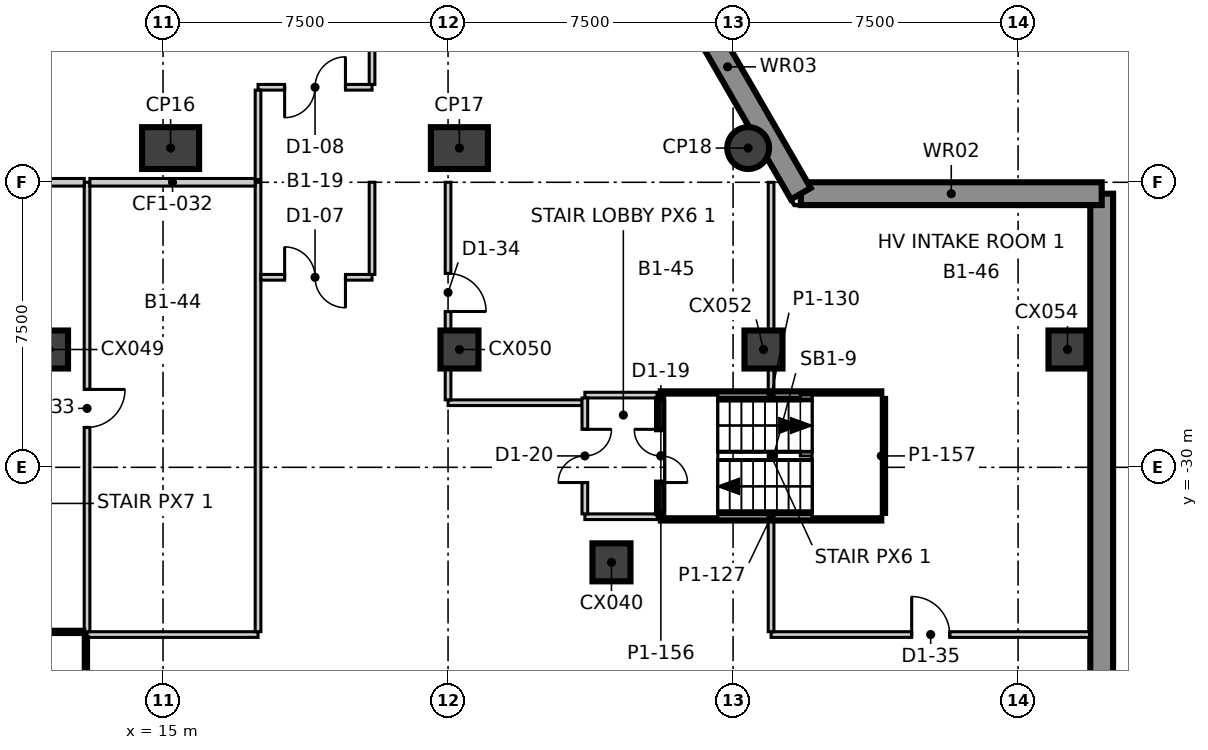
"""IFC4 building model, lengths in metres.
Left out: names, types, materials, properties, quantities, classifications, styles, units other than length and angle.
Written with IfcOpenShell. Run it as: python <this file> out.ifc"""

import sys

from ifc_helpers import new_model, si_unit, direction, frame, frame_2d, origin, origin_2d, place, context, subcontext, project, spatial, rectangle, circle, extrude, element, fill, save


model = new_model("IFC4")
c1 = context("Model", 3, precision=1e-05, world=origin(), true_north=direction((0.0, 1.0)))
c2 = subcontext(c1, "Body", "Model", "MODEL_VIEW")
j1 = project(units=[si_unit("LENGTHUNIT", "METRE"), si_unit("PLANEANGLEUNIT", "RADIAN")], contexts=[c1])
p1 = place(None, origin())
s1 = spatial("IfcSite", under=j1, at=p1, CompositionType="ELEMENT")
p2 = place(p1, origin())
s2 = spatial("IfcBuilding", under=s1, at=p2, CompositionType="ELEMENT")
p3 = place(p2, frame((0.0, 0.0, -5.5)))
s3 = spatial("IfcBuildingStorey", under=s2, at=p3, CompositionType="ELEMENT", Elevation=-5.5)
p4 = place(p3, frame((39.7, -50.2, -0.4), z_axis=(0.0, 0.0, 1.0), x_axis=(0.0, 1.0, 0.0)))
e1 = element("IfcWall", 1, at=p4, inside=s3, PredefinedType="SOLIDWALL", context=c2, shape_type="SweptSolid", body=[
    extrude(rectangle(XDim=27.4, YDim=0.6, at=frame_2d((13.7, 0.0))), origin(), (0.0, 0.0, 1.0), 5.5),
])
p5 = place(p3, frame((39.7, -22.8, -0.4), z_axis=(0.0, 0.0, 1.0), x_axis=(-1.0, 0.0, 0.0)))
e2 = element("IfcWall", 2, at=p5, inside=s3, PredefinedType="SOLIDWALL", context=c2, shape_type="SweptSolid", body=[
    extrude(rectangle(XDim=7.917, YDim=0.6, at=frame_2d((3.958, 0.0))), origin(), (0.0, 0.0, 1.0), 5.5),
])
p6 = place(p3, frame((31.783, -22.8, -0.4), z_axis=(0.0, 0.0, 1.0), x_axis=(-0.500015828289, 0.866016265125, 0.0)))
e3 = element("IfcWall", 3, at=p6, inside=s3, PredefinedType="SOLIDWALL", context=c2, shape_type="SweptSolid", body=[
    extrude(rectangle(XDim=7.708, YDim=0.6, at=frame_2d((3.854, 0.0))), origin(), (0.0, 0.0, 1.0), 5.5),
])
for number, where, z_axis, x_axis in (
    (4, (15.199, -21.6, -0.4), (0.0, 0.0, 1.0), (1.0, 0.0, 0.0)),
    (5, (22.798, -21.6, -0.4), (0.0, 0.0, 1.0), (1.0, 0.0, 0.0)),
):
    element("IfcColumn", number, at=place(p3, frame(where, z_axis=z_axis, x_axis=x_axis)), inside=s3, PredefinedType="COLUMN", context=c2, shape_type="SweptSolid", body=[
        extrude(rectangle(XDim=1.5, YDim=1.1, at=origin_2d()), origin(), (0.0, 0.0, 1.0), 5.5),
    ])
p7 = place(p3, frame((30.397, -21.6, -0.4), z_axis=(0.0, 0.0, 1.0), x_axis=(1.0, 0.0, 0.0)))
e6 = element("IfcColumn", 6, at=p7, inside=s3, PredefinedType="COLUMN", context=c2, shape_type="SweptSolid", body=[
    extrude(circle(Radius=0.55, at=origin_2d()), origin(), (0.0, 0.0, 1.0), 5.5),
])
for number, where, z_axis, x_axis in (
    (7, (26.8, -32.5, -0.4), (0.0, 0.0, 1.0), (1.0, 0.0, 0.0)),
    (8, (12.0, -26.9, -0.4), (0.0, 0.0, 1.0), (1.0, 0.0, 0.0)),
    (9, (22.8, -26.9, -0.4), (0.0, 0.0, 1.0), (1.0, 0.0, 0.0)),
    (10, (30.8, -26.9, -0.4), (0.0, 0.0, 1.0), (1.0, 0.0, 0.0)),
    (11, (38.8, -26.9, -0.4), (0.0, 0.0, 1.0), (1.0, 0.0, 0.0)),
):
    element("IfcColumn", number, at=place(p3, frame(where, z_axis=z_axis, x_axis=x_axis)), inside=s3, PredefinedType="COLUMN", context=c2, shape_type="SweptSolid", body=[
        extrude(rectangle(XDim=1.0, YDim=1.0, at=origin_2d()), origin(), (0.0, 0.0, 1.0), 5.5),
    ])
for number, where, z_axis, x_axis in (
    (12, (26.1, -28.1, 0.0), (0.0, 0.0, 1.0), (1.0, 0.0, 0.0)),
    (13, (26.1, -31.3, 0.0), (0.0, 0.0, 1.0), (1.0, 0.0, 0.0)),
):
    element("IfcWall", number, at=place(p3, frame(where, z_axis=z_axis, x_axis=x_axis)), inside=s3, PredefinedType="PARTITIONING", context=c2, shape_type="SweptSolid", body=[
        extrude(rectangle(XDim=1.9, YDim=0.15, at=frame_2d((0.95, 0.0))), origin(), (0.0, 0.0, 1.0), 5.1),
    ])
p8 = place(p3, frame((13.0, -34.4, 0.0), z_axis=(0.0, 0.0, 1.0), x_axis=(1.0, 0.0, 0.0)))
e14 = element("IfcWall", 14, at=p8, inside=s3, PredefinedType="PARTITIONING", context=c2, shape_type="SweptSolid", body=[
    extrude(rectangle(XDim=4.5, YDim=0.15, at=frame_2d((2.25, 0.0))), origin(), (0.0, 0.0, 1.0), 5.1),
])
p9 = place(p3, frame((31.0, -34.4, 0.0), z_axis=(0.0, 0.0, 1.0), x_axis=(1.0, 0.0, 0.0)))
e15 = element("IfcWall", 15, at=p9, inside=s3, PredefinedType="PARTITIONING", context=c2, shape_type="SweptSolid", body=[
    extrude(rectangle(XDim=8.4, YDim=0.15, at=frame_2d((4.2, 0.0))), origin(), (0.0, 0.0, 1.0), 5.1),
])
p10 = place(p9, frame((3.7, 0.0, 0.0)))
e16 = element("IfcOpeningElement", 16, at=p10, cuts=e15, PredefinedType="OPENING", context=c2, shape_type="SweptSolid", body=[
    extrude(rectangle(XDim=1.0, YDim=2.1, at=frame_2d((0.5, 1.05))), frame((0.0, 0.085, 0.0), z_axis=(0.0, -1.0, 0.0), x_axis=(1.0, 0.0, 0.0)), (0.0, 0.0, 1.0), 0.17),
])
p11 = place(p3, frame((17.5, -34.325, 0.0), z_axis=(0.0, 0.0, 1.0), x_axis=(0.0, 1.0, 0.0)))
e17 = element("IfcWall", 17, at=p11, inside=s3, PredefinedType="PARTITIONING", context=c2, shape_type="SweptSolid", body=[
    extrude(rectangle(XDim=11.825, YDim=0.15, at=frame_2d((5.913, 0.0))), origin(), (0.0, 0.0, 1.0), 5.1),
])
p12 = place(p3, frame((13.0, -34.325, 0.0), z_axis=(0.0, 0.0, 1.0), x_axis=(0.0, 1.0, 0.0)))
e18 = element("IfcWall", 18, at=p12, inside=s3, PredefinedType="PARTITIONING", context=c2, shape_type="SweptSolid", body=[
    extrude(rectangle(XDim=11.825, YDim=0.15, at=frame_2d((5.913, 0.0))), origin(), (0.0, 0.0, 1.0), 5.1),
])
p13 = place(p12, frame((5.375, 0.0, 0.0)))
e19 = element("IfcOpeningElement", 19, at=p13, cuts=e18, PredefinedType="OPENING", context=c2, shape_type="SweptSolid", body=[
    extrude(rectangle(XDim=1.0, YDim=2.1, at=frame_2d((0.5, 1.05))), frame((0.0, 0.085, 0.0), z_axis=(0.0, -1.0, 0.0), x_axis=(1.0, 0.0, 0.0)), (0.0, 0.0, 1.0), 0.17),
])
p14 = place(p3, frame((13.075, -22.5, 0.0), z_axis=(0.0, 0.0, 1.0), x_axis=(1.0, 0.0, 0.0)))
e20 = element("IfcWall", 20, at=p14, inside=s3, PredefinedType="SOLIDWALL", context=c2, shape_type="SweptSolid", body=[
    extrude(rectangle(XDim=4.35, YDim=0.2, at=frame_2d((2.175, 0.0))), origin(), (0.0, 0.0, 1.0), 5.1),
])
p15 = place(p3, frame((22.5, -28.3, 0.0), z_axis=(0.0, 0.0, 1.0), x_axis=(1.0, 0.0, 0.0)))
e21 = element("IfcWall", 21, at=p15, inside=s3, PredefinedType="PARTITIONING", context=c2, shape_type="SweptSolid", body=[
    extrude(rectangle(XDim=3.525, YDim=0.15, at=frame_2d((1.762, 0.0))), origin(), (0.0, 0.0, 1.0), 5.1),
])
p16 = place(p3, frame((22.5, -28.225, 0.0), z_axis=(0.0, 0.0, 1.0), x_axis=(0.0, 1.0, 0.0)))
e22 = element("IfcWall", 22, at=p16, inside=s3, PredefinedType="PARTITIONING", context=c2, shape_type="SweptSolid", body=[
    extrude(rectangle(XDim=5.725, YDim=0.15, at=frame_2d((2.863, 0.0))), origin(), (0.0, 0.0, 1.0), 5.1),
])
p17 = place(p16, frame((2.325, 0.0, 0.0)))
e23 = element("IfcOpeningElement", 23, at=p17, cuts=e22, PredefinedType="OPENING", context=c2, shape_type="SweptSolid", body=[
    extrude(rectangle(XDim=1.0, YDim=2.1, at=frame_2d((0.5, 1.05))), frame((0.0, 0.085, 0.0), z_axis=(0.0, -1.0, 0.0), x_axis=(1.0, 0.0, 0.0)), (0.0, 0.0, 1.0), 0.17),
])
p18 = place(p3, frame((26.1, -31.225, 0.0), z_axis=(0.0, 0.0, 1.0), x_axis=(0.0, 1.0, 0.0)))
e24 = element("IfcWall", 24, at=p18, inside=s3, PredefinedType="PARTITIONING", context=c2, shape_type="SweptSolid", body=[
    extrude(rectangle(XDim=3.05, YDim=0.15, at=frame_2d((1.525, 0.0))), origin(), (0.0, 0.0, 1.0), 5.1),
])
p19 = place(p18, frame((0.825, 0.0, 0.0)))
e25 = element("IfcOpeningElement", 25, at=p19, cuts=e24, PredefinedType="OPENING", context=c2, shape_type="SweptSolid", body=[
    extrude(rectangle(XDim=1.4, YDim=2.1, at=frame_2d((0.7, 1.05))), frame((0.0, 0.085, 0.0), z_axis=(0.0, -1.0, 0.0), x_axis=(1.0, 0.0, 0.0)), (0.0, 0.0, 1.0), 0.17),
])
p20 = place(p3, frame((31.0, -34.325, 0.0), z_axis=(0.0, 0.0, 1.0), x_axis=(0.0, 1.0, 0.0)))
e26 = element("IfcWall", 26, at=p20, inside=s3, PredefinedType="PARTITIONING", context=c2, shape_type="SweptSolid", body=[
    extrude(rectangle(XDim=2.925, YDim=0.15, at=frame_2d((1.462, 0.0))), origin(), (0.0, 0.0, 1.0), 5.1),
])
p21 = place(p3, frame((31.0, -28.0, 0.0), z_axis=(0.0, 0.0, 1.0), x_axis=(0.0, 1.0, 0.0)))
e27 = element("IfcWall", 27, at=p21, inside=s3, PredefinedType="PARTITIONING", context=c2, shape_type="SweptSolid", body=[
    extrude(rectangle(XDim=5.5, YDim=0.15, at=frame_2d((2.75, 0.0))), origin(), (0.0, 0.0, 1.0), 5.1),
])
p22 = place(p3, frame((17.5, -20.0, 0.0), z_axis=(0.0, 0.0, 1.0), x_axis=(1.0, 0.0, 0.0)))
e28 = element("IfcWall", 28, at=p22, inside=s3, PredefinedType="PARTITIONING", context=c2, shape_type="SweptSolid", body=[
    extrude(rectangle(XDim=3.0, YDim=0.15, at=frame_2d((1.5, 0.0))), origin(), (0.0, 0.0, 1.0), 5.1),
])
p23 = place(p22, frame((0.7, 0.0, 0.0)))
e29 = element("IfcOpeningElement", 29, at=p23, cuts=e28, PredefinedType="OPENING", context=c2, shape_type="SweptSolid", body=[
    extrude(rectangle(XDim=1.6, YDim=2.1, at=frame_2d((0.8, 1.05))), frame((0.0, 0.085, 0.0), z_axis=(0.0, -1.0, 0.0), x_axis=(1.0, 0.0, 0.0)), (0.0, 0.0, 1.0), 0.17),
])
p24 = place(p3, frame((17.575, -25.0, 0.0), z_axis=(0.0, 0.0, 1.0), x_axis=(1.0, 0.0, 0.0)))
e30 = element("IfcWall", 30, at=p24, inside=s3, PredefinedType="PARTITIONING", context=c2, shape_type="SweptSolid", body=[
    extrude(rectangle(XDim=2.925, YDim=0.15, at=frame_2d((1.462, 0.0))), origin(), (0.0, 0.0, 1.0), 5.1),
])
p25 = place(p24, frame((0.625, 0.0, 0.0)))
e31 = element("IfcOpeningElement", 31, at=p25, cuts=e30, PredefinedType="OPENING", context=c2, shape_type="SweptSolid", body=[
    extrude(rectangle(XDim=1.6, YDim=2.1, at=frame_2d((0.8, 1.05))), frame((0.0, 0.085, 0.0), z_axis=(0.0, -1.0, 0.0), x_axis=(1.0, 0.0, 0.0)), (0.0, 0.0, 1.0), 0.17),
])
p26 = place(p3, frame((20.5, -24.925, 0.0), z_axis=(0.0, 0.0, 1.0), x_axis=(0.0, 1.0, 0.0)))
e32 = element("IfcWall", 32, at=p26, inside=s3, PredefinedType="PARTITIONING", context=c2, shape_type="SweptSolid", body=[
    extrude(rectangle(XDim=2.427, YDim=0.15, at=frame_2d((1.213, 0.0))), origin(), (0.0, 0.0, 1.0), 5.1),
])
p27 = place(p3, frame((17.5, -22.427, 0.0), z_axis=(0.0, 0.0, 1.0), x_axis=(0.0, 1.0, 0.0)))
e33 = element("IfcWall", 33, at=p27, inside=s3, PredefinedType="PARTITIONING", context=c2, shape_type="SweptSolid", body=[
    extrude(rectangle(XDim=2.352, YDim=0.15, at=frame_2d((1.176, 0.0))), origin(), (0.0, 0.0, 1.0), 5.1),
])
p28 = place(p3, frame((-17.425, -22.5, 0.0), z_axis=(0.0, 0.0, 1.0), x_axis=(1.0, 0.0, 0.0)))
e34 = element("IfcWall", 34, at=p28, inside=s3, PredefinedType="SOLIDWALL", context=c2, shape_type="SweptSolid", body=[
    extrude(rectangle(XDim=30.352, YDim=0.2, at=frame_2d((15.176, 0.0))), origin(), (0.0, 0.0, 1.0), 5.1),
])
p29 = place(p3, frame((20.5, -19.925, 0.0), z_axis=(0.0, 0.0, 1.0), x_axis=(0.0, 1.0, 0.0)))
e35 = element("IfcWall", 35, at=p29, inside=s3, PredefinedType="PARTITIONING", context=c2, shape_type="SweptSolid", body=[
    extrude(rectangle(XDim=1.65, YDim=0.15, at=frame_2d((0.825, 0.0))), origin(), (0.0, 0.0, 1.0), 5.1),
])
for number, where, z_axis, x_axis in (
    (36, (28.1, -31.3, 0.0), (0.0, 0.0, 1.0), (1.0, 0.0, 0.0)),
    (37, (28.1, -28.1, 0.0), (0.0, 0.0, 1.0), (1.0, 0.0, 0.0)),
    (38, (7.1, -34.4, 0.0), (0.0, 0.0, 1.0), (1.0, 0.0, 0.0)),
):
    element("IfcWall", number, at=place(p3, frame(where, z_axis=z_axis, x_axis=x_axis)), inside=s3, PredefinedType="SOLIDWALL", context=c2, shape_type="SweptSolid", body=[
        extrude(rectangle(XDim=5.8, YDim=0.2, at=frame_2d((2.9, 0.0))), origin(), (0.0, 0.0, 1.0), 5.1),
    ])
p30 = place(p3, frame((12.9, -37.5, 0.0), z_axis=(0.0, 0.0, 1.0), x_axis=(0.0, 1.0, 0.0)))
e39 = element("IfcWall", 39, at=p30, inside=s3, PredefinedType="SOLIDWALL", context=c2, shape_type="SweptSolid", body=[
    extrude(rectangle(XDim=3.0, YDim=0.2, at=frame_2d((1.5, 0.0))), origin(), (0.0, 0.0, 1.0), 5.1),
])
p31 = place(p3, frame((28.1, -31.2, 0.0), z_axis=(0.0, 0.0, 1.0), x_axis=(0.0, 1.0, 0.0)))
e40 = element("IfcWall", 40, at=p31, inside=s3, PredefinedType="SOLIDWALL", context=c2, shape_type="SweptSolid", body=[
    extrude(rectangle(XDim=3.0, YDim=0.2, at=frame_2d((1.5, 0.0))), origin(), (0.0, 0.0, 1.0), 5.1),
])
p32 = place(p31, frame((0.8, 0.0, 0.0)))
e41 = element("IfcOpeningElement", 41, at=p32, cuts=e40, PredefinedType="OPENING", context=c2, shape_type="SweptSolid", body=[
    extrude(rectangle(XDim=1.4, YDim=2.1, at=frame_2d((0.7, 1.05))), frame((0.0, 0.11, 0.0), z_axis=(0.0, -1.0, 0.0), x_axis=(1.0, 0.0, 0.0)), (0.0, 0.0, 1.0), 0.22),
])
p33 = place(p3, frame((33.9, -31.2, 0.0), z_axis=(0.0, 0.0, 1.0), x_axis=(0.0, 1.0, 0.0)))
e42 = element("IfcWall", 42, at=p33, inside=s3, PredefinedType="SOLIDWALL", context=c2, shape_type="SweptSolid", body=[
    extrude(rectangle(XDim=3.0, YDim=0.2, at=frame_2d((1.5, 0.0))), origin(), (0.0, 0.0, 1.0), 5.1),
])
p34 = place(p25, origin())
e43 = element("IfcDoor", 43, at=p34, inside=s3, OperationType="DOUBLE_DOOR_SINGLE_SWING", PredefinedType="DOOR", context=c2, shape_type="SweptSolid", body=[
    extrude(rectangle(XDim=1.6, YDim=2.1, at=frame_2d((0.8, 1.05))), frame((0.0, 0.025, 0.0), z_axis=(0.0, -1.0, 0.0), x_axis=(1.0, 0.0, 0.0)), (0.0, 0.0, 1.0), 0.05),
])
fill(e31, e43)
p35 = place(p23, origin())
e44 = element("IfcDoor", 44, at=p35, inside=s3, OperationType="DOUBLE_DOOR_SINGLE_SWING", PredefinedType="DOOR", context=c2, shape_type="SweptSolid", body=[
    extrude(rectangle(XDim=1.6, YDim=2.1, at=frame_2d((0.8, 1.05))), frame((0.0, 0.025, 0.0), z_axis=(0.0, -1.0, 0.0), x_axis=(1.0, 0.0, 0.0)), (0.0, 0.0, 1.0), 0.05),
])
fill(e29, e44)
p36 = place(p32, origin())
e45 = element("IfcDoor", 45, at=p36, inside=s3, OperationType="DOUBLE_DOOR_SINGLE_SWING", PredefinedType="DOOR", context=c2, shape_type="SweptSolid", body=[
    extrude(rectangle(XDim=1.4, YDim=2.1, at=frame_2d((0.7, 1.05))), frame((0.0, 0.025, 0.0), z_axis=(0.0, -1.0, 0.0), x_axis=(1.0, 0.0, 0.0)), (0.0, 0.0, 1.0), 0.05),
])
fill(e41, e45)
p37 = place(p19, origin())
e46 = element("IfcDoor", 46, at=p37, inside=s3, OperationType="DOUBLE_DOOR_SINGLE_SWING", PredefinedType="DOOR", context=c2, shape_type="SweptSolid", body=[
    extrude(rectangle(XDim=1.4, YDim=2.1, at=frame_2d((0.7, 1.05))), frame((0.0, 0.025, 0.0), z_axis=(0.0, -1.0, 0.0), x_axis=(1.0, 0.0, 0.0)), (0.0, 0.0, 1.0), 0.05),
])
fill(e25, e46)
p38 = place(p13, origin())
e47 = element("IfcDoor", 47, at=p38, inside=s3, OperationType="SINGLE_SWING_RIGHT", PredefinedType="DOOR", context=c2, shape_type="SweptSolid", body=[
    extrude(rectangle(XDim=1.0, YDim=2.1, at=frame_2d((0.5, 1.05))), frame((0.0, 0.025, 0.0), z_axis=(0.0, -1.0, 0.0), x_axis=(1.0, 0.0, 0.0)), (0.0, 0.0, 1.0), 0.05),
])
fill(e19, e47)
p39 = place(p17, origin())
e48 = element("IfcDoor", 48, at=p39, inside=s3, OperationType="SINGLE_SWING_LEFT", PredefinedType="DOOR", context=c2, shape_type="SweptSolid", body=[
    extrude(rectangle(XDim=1.0, YDim=2.1, at=frame_2d((0.5, 1.05))), frame((0.0, 0.025, 0.0), z_axis=(0.0, -1.0, 0.0), x_axis=(1.0, 0.0, 0.0)), (0.0, 0.0, 1.0), 0.05),
])
fill(e23, e48)
p40 = place(p10, origin())
e49 = element("IfcDoor", 49, at=p40, inside=s3, OperationType="SINGLE_SWING_RIGHT", PredefinedType="DOOR", context=c2, shape_type="SweptSolid", body=[
    extrude(rectangle(XDim=1.0, YDim=2.1, at=frame_2d((0.5, 1.05))), frame((0.0, 0.025, 0.0), z_axis=(0.0, -1.0, 0.0), x_axis=(1.0, 0.0, 0.0)), (0.0, 0.0, 1.0), 0.05),
])
fill(e16, e49)
save(model, sys.argv[1])
